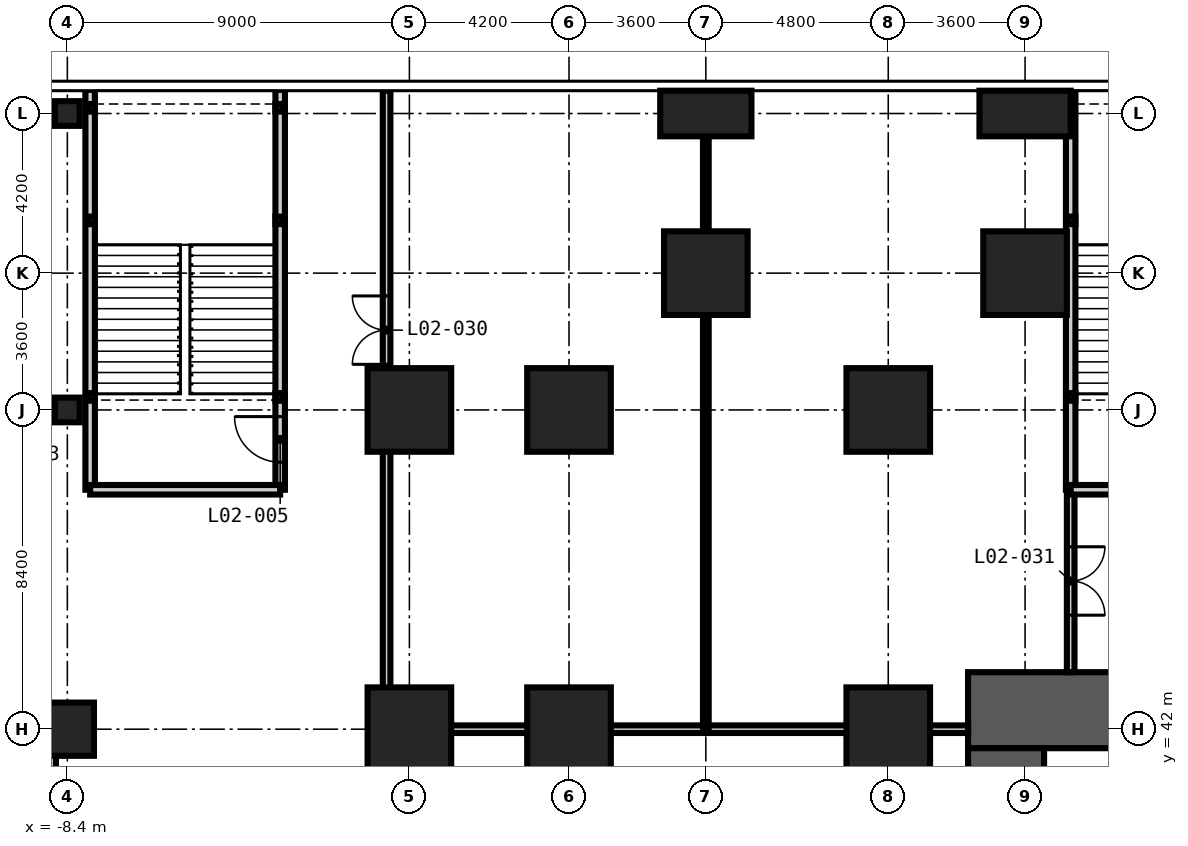
"""IFC4 building model, lengths in metres.
Left out: names, types, materials, properties, quantities, classifications, styles, units other than length and angle.
Written with IfcOpenShell. Run it as: python <this file> out.ifc"""

import sys

from ifc_helpers import new_model, si_unit, direction, frame, frame_2d, origin, origin_2d, place, context, subcontext, project, spatial, rectangle, hollow_rectangle, extrude, element, fill, save


model = new_model("IFC4")
c1 = context("Model", 3, precision=1e-05, world=origin(), true_north=direction((0.0, 1.0)))
c2 = subcontext(c1, "Body", "Model", "MODEL_VIEW")
j1 = project(units=[si_unit("LENGTHUNIT", "METRE"), si_unit("PLANEANGLEUNIT", "RADIAN")], contexts=[c1])
p1 = place(None, origin())
s1 = spatial("IfcSite", under=j1, at=p1, CompositionType="ELEMENT")
p2 = place(p1, origin())
s2 = spatial("IfcBuilding", under=s1, at=p2, CompositionType="ELEMENT")
p3 = place(p2, frame((0.0, 0.0, 12.0)))
s3 = spatial("IfcBuildingStorey", under=s2, at=p3, CompositionType="ELEMENT", Elevation=12.0)
for number, where, z_axis, x_axis in (
    (1, (0.6, 42.0, -0.3), (0.0, 0.0, 1.0), (1.0, 0.0, 0.0)),
    (2, (0.6, 50.4, -0.3), (0.0, 0.0, 1.0), (1.0, 0.0, 0.0)),
    (3, (4.8, 42.0, -0.3), (0.0, 0.0, 1.0), (1.0, 0.0, 0.0)),
    (4, (4.8, 50.4, -0.3), (0.0, 0.0, 1.0), (1.0, 0.0, 0.0)),
    (5, (8.4, 54.0, -0.3), (0.0, 0.0, 1.0), (1.0, 0.0, 0.0)),
):
    element("IfcColumn", number, at=place(p3, frame(where, z_axis=z_axis, x_axis=x_axis)), inside=s3, PredefinedType="COLUMN", context=c2, shape_type="SweptSolid", body=[
        extrude(rectangle(XDim=2.2, YDim=2.2, at=origin_2d()), origin(), (0.0, 0.0, 1.0), 5.0),
    ])
p4 = place(p3, frame((8.4, 58.2, -0.3), z_axis=(0.0, 0.0, 1.0), x_axis=(1.0, 0.0, 0.0)))
e6 = element("IfcColumn", 6, at=p4, inside=s3, PredefinedType="COLUMN", context=c2, shape_type="SweptSolid", body=[
    extrude(rectangle(XDim=2.4, YDim=1.2, at=origin_2d()), origin(), (0.0, 0.0, 1.0), 5.0),
])
for number, where, z_axis, x_axis in (
    (7, (13.2, 42.0, -0.3), (0.0, 0.0, 1.0), (1.0, 0.0, 0.0)),
    (8, (13.2, 50.4, -0.3), (0.0, 0.0, 1.0), (1.0, 0.0, 0.0)),
    (9, (16.8, 54.0, -0.3), (0.0, 0.0, 1.0), (1.0, 0.0, 0.0)),
):
    element("IfcColumn", number, at=place(p3, frame(where, z_axis=z_axis, x_axis=x_axis)), inside=s3, PredefinedType="COLUMN", context=c2, shape_type="SweptSolid", body=[
        extrude(rectangle(XDim=2.2, YDim=2.2, at=origin_2d()), origin(), (0.0, 0.0, 1.0), 5.0),
    ])
p5 = place(p3, frame((16.8, 58.2, -0.3), z_axis=(0.0, 0.0, 1.0), x_axis=(1.0, 0.0, 0.0)))
e10 = element("IfcColumn", 10, at=p5, inside=s3, PredefinedType="COLUMN", context=c2, shape_type="SweptSolid", body=[
    extrude(rectangle(XDim=2.4, YDim=1.2, at=origin_2d()), origin(), (0.0, 0.0, 1.0), 5.0),
])
p6 = place(p3, frame((-8.4, 42.0, -0.3), z_axis=(0.0, 0.0, 1.0), x_axis=(1.0, 0.0, 0.0)))
e11 = element("IfcColumn", 11, at=p6, inside=s3, PredefinedType="COLUMN", context=c2, shape_type="SweptSolid", body=[
    extrude(rectangle(XDim=1.4, YDim=1.4, at=origin_2d()), origin(), (0.0, 0.0, 1.0), 5.0),
])
for number, where, z_axis, x_axis in (
    (12, (-8.4, 50.4, -0.3), (0.0, 0.0, 1.0), (1.0, 0.0, 0.0)),
    (13, (-8.4, 58.2, -0.3), (0.0, 0.0, 1.0), (1.0, 0.0, 0.0)),
):
    element("IfcColumn", number, at=place(p3, frame(where, z_axis=z_axis, x_axis=x_axis)), inside=s3, PredefinedType="COLUMN", context=c2, shape_type="SweptSolid", body=[
        extrude(rectangle(XDim=0.65, YDim=0.65, at=origin_2d()), origin(), (0.0, 0.0, 1.0), 5.0),
    ])
p7 = place(p3, frame((43.5, 42.5, -0.3), z_axis=(0.0, 0.0, 1.0), x_axis=(-1.0, 0.0, 0.0)))
e14 = element("IfcWall", 14, at=p7, inside=s3, PredefinedType="SHEAR", context=c2, shape_type="SweptSolid", body=[
    extrude(rectangle(XDim=28.2, YDim=2.0, at=frame_2d((14.1, 0.0))), origin(), (0.0, 0.0, 1.0), 5.0),
])
p8 = place(p7, frame((21.4, 0.0, 0.3)))
e15 = element("IfcOpeningElement", 15, at=p8, cuts=e14, PredefinedType="OPENING", context=c2, shape_type="SweptSolid", body=[
    extrude(rectangle(XDim=1.0, YDim=2.1, at=frame_2d((0.5, 1.05))), frame((0.0, 1.01, 0.0), z_axis=(0.0, -1.0, 0.0), x_axis=(1.0, 0.0, 0.0)), (0.0, 0.0, 1.0), 2.02),
])
p9 = place(p7, frame((11.4, 0.0, 0.3)))
e16 = element("IfcOpeningElement", 16, at=p9, cuts=e14, PredefinedType="OPENING", context=c2, shape_type="SweptSolid", body=[
    extrude(rectangle(XDim=1.2, YDim=2.2, at=frame_2d((0.6, 1.1))), frame((0.0, 1.01, 0.0), z_axis=(0.0, -1.0, 0.0), x_axis=(1.0, 0.0, 0.0)), (0.0, 0.0, 1.0), 2.02),
])
p10 = place(p3, frame((16.3, 41.5, -0.3), z_axis=(0.0, 0.0, 1.0), x_axis=(0.0, -1.0, 0.0)))
e17 = element("IfcWall", 17, at=p10, inside=s3, PredefinedType="SHEAR", context=c2, shape_type="SweptSolid", body=[
    extrude(rectangle(XDim=24.2, YDim=2.0, at=frame_2d((12.1, 0.0))), origin(), (0.0, 0.0, 1.0), 5.0),
])
p11 = place(p10, frame((11.2, 0.0, 0.3)))
e18 = element("IfcOpeningElement", 18, at=p11, cuts=e17, PredefinedType="OPENING", context=c2, shape_type="SweptSolid", body=[
    extrude(rectangle(XDim=1.8, YDim=2.2, at=frame_2d((0.9, 1.1))), frame((0.0, 1.01, 0.0), z_axis=(0.0, -1.0, 0.0), x_axis=(1.0, 0.0, 0.0)), (0.0, 0.0, 1.0), 2.02),
])
p12 = place(p10, frame((20.0, 0.0, 0.3)))
e19 = element("IfcOpeningElement", 19, at=p12, cuts=e17, PredefinedType="OPENING", context=c2, shape_type="SweptSolid", body=[
    extrude(rectangle(XDim=1.0, YDim=2.1, at=frame_2d((0.5, 1.05))), frame((0.0, 1.01, 0.0), z_axis=(0.0, -1.0, 0.0), x_axis=(1.0, 0.0, 0.0)), (0.0, 0.0, 1.0), 2.02),
])
p13 = place(p10, frame((5.3, 0.0, 0.3)))
e20 = element("IfcOpeningElement", 20, at=p13, cuts=e17, PredefinedType="OPENING", context=c2, shape_type="SweptSolid", body=[
    extrude(rectangle(XDim=1.0, YDim=2.1, at=frame_2d((0.5, 1.05))), frame((0.0, 1.01, 0.0), z_axis=(0.0, -1.0, 0.0), x_axis=(1.0, 0.0, 0.0)), (0.0, 0.0, 1.0), 2.02),
])
p14 = place(p3, frame((-8.85, 42.0, 0.0), z_axis=(0.0, 0.0, 1.0), x_axis=(0.0, -1.0, 0.0)))
e21 = element("IfcWall", 21, at=p14, inside=s3, PredefinedType="PARTITIONING", context=c2, shape_type="SweptSolid", body=[
    extrude(rectangle(XDim=33.6, YDim=0.3, at=frame_2d((16.8, 0.0))), origin(), (0.0, 0.0, 1.0), 4.7),
])
p15 = place(p3, frame((0.0, 42.0, 0.0), z_axis=(0.0, 0.0, 1.0), x_axis=(0.0, 1.0, 0.0)))
e22 = element("IfcWall", 22, at=p15, inside=s3, PredefinedType="PARTITIONING", context=c2, shape_type="SweptSolid", body=[
    extrude(rectangle(XDim=16.8, YDim=0.2, at=frame_2d((8.4, 0.0))), origin(), (0.0, 0.0, 1.0), 4.7),
])
p16 = place(p15, frame((9.6, 0.0, 0.0)))
e23 = element("IfcOpeningElement", 23, at=p16, cuts=e22, PredefinedType="OPENING", context=c2, shape_type="SweptSolid", body=[
    extrude(rectangle(XDim=1.8, YDim=2.4, at=frame_2d((0.9, 1.2))), frame((0.0, 0.11, 0.0), z_axis=(0.0, -1.0, 0.0), x_axis=(1.0, 0.0, 0.0)), (0.0, 0.0, 1.0), 0.22),
])
p17 = place(p3, frame((18.0, 48.3, 0.0), z_axis=(0.0, 0.0, 1.0), x_axis=(0.0, -1.0, 0.0)))
e24 = element("IfcWall", 24, at=p17, inside=s3, PredefinedType="PARTITIONING", context=c2, shape_type="SweptSolid", body=[
    extrude(rectangle(XDim=4.8, YDim=0.2, at=frame_2d((2.4, 0.0))), origin(), (0.0, 0.0, 1.0), 4.7),
])
p18 = place(p17, frame((1.5, 0.0, 0.0)))
e25 = element("IfcOpeningElement", 25, at=p18, cuts=e24, PredefinedType="OPENING", context=c2, shape_type="SweptSolid", body=[
    extrude(rectangle(XDim=1.8, YDim=2.4, at=frame_2d((0.9, 1.2))), frame((0.0, 0.11, 0.0), z_axis=(0.0, -1.0, 0.0), x_axis=(1.0, 0.0, 0.0)), (0.0, 0.0, 1.0), 0.22),
])
p19 = place(p3, frame((15.3, 42.0, 0.0), z_axis=(0.0, 0.0, 1.0), x_axis=(-1.0, 0.0, 0.0)))
e26 = element("IfcWall", 26, at=p19, inside=s3, PredefinedType="PARTITIONING", context=c2, shape_type="SweptSolid", body=[
    extrude(rectangle(XDim=15.3, YDim=0.2, at=frame_2d((7.65, 0.0))), origin(), (0.0, 0.0, 1.0), 4.7),
])
p20 = place(p3, frame((8.4, 42.0, 0.0), z_axis=(0.0, 0.0, 1.0), x_axis=(0.0, 1.0, 0.0)))
e27 = element("IfcWall", 27, at=p20, inside=s3, PredefinedType="PARTITIONING", context=c2, shape_type="SweptSolid", body=[
    extrude(rectangle(XDim=16.8, YDim=0.15, at=frame_2d((8.4, 0.0))), origin(), (0.0, 0.0, 1.0), 4.7),
])
p21 = place(p3, frame((-7.8, 48.3, 0.0), z_axis=(0.0, 0.0, 1.0), x_axis=(0.0, 1.0, 0.0)))
e28 = element("IfcWall", 28, at=p21, inside=s3, PredefinedType="PARTITIONING", context=c2, shape_type="SweptSolid", body=[
    extrude(rectangle(XDim=10.523, YDim=0.25, at=frame_2d((5.261, 0.0))), origin(), (0.0, 0.0, 1.0), 4.7),
])
p22 = place(p3, frame((-2.8, 48.3, 0.0), z_axis=(0.0, 0.0, 1.0), x_axis=(0.0, 1.0, 0.0)))
e29 = element("IfcWall", 29, at=p22, inside=s3, PredefinedType="PARTITIONING", context=c2, shape_type="SweptSolid", body=[
    extrude(rectangle(XDim=10.523, YDim=0.25, at=frame_2d((5.261, 0.0))), origin(), (0.0, 0.0, 1.0), 4.7),
])
p23 = place(p22, frame((0.725, 0.0, 0.0)))
e30 = element("IfcOpeningElement", 30, at=p23, cuts=e29, PredefinedType="OPENING", context=c2, shape_type="SweptSolid", body=[
    extrude(rectangle(XDim=1.2, YDim=2.2, at=frame_2d((0.6, 1.1))), frame((0.0, 0.135, 0.0), z_axis=(0.0, -1.0, 0.0), x_axis=(1.0, 0.0, 0.0)), (0.0, 0.0, 1.0), 0.27),
])
p24 = place(p3, frame((18.0, 48.3, 0.0), z_axis=(0.0, 0.0, 1.0), x_axis=(0.0, 1.0, 0.0)))
e31 = element("IfcWall", 31, at=p24, inside=s3, PredefinedType="PARTITIONING", context=c2, shape_type="SweptSolid", body=[
    extrude(rectangle(XDim=10.523, YDim=0.25, at=frame_2d((5.261, 0.0))), origin(), (0.0, 0.0, 1.0), 4.7),
])
for number, where, z_axis, x_axis in (
    (32, (-7.8, 48.3, 0.0), (0.0, 0.0, 1.0), (1.0, 0.0, 0.0)),
    (33, (18.0, 48.3, 0.0), (0.0, 0.0, 1.0), (1.0, 0.0, 0.0)),
):
    element("IfcWall", number, at=place(p3, frame(where, z_axis=z_axis, x_axis=x_axis)), inside=s3, PredefinedType="PARTITIONING", context=c2, shape_type="SweptSolid", body=[
        extrude(rectangle(XDim=5.0, YDim=0.25, at=frame_2d((2.5, 0.0))), origin(), (0.0, 0.0, 1.0), 4.7),
    ])
for number, where, z_axis, x_axis in (
    (34, (-7.775, 50.742, -0.3), (0.0, 0.0, 1.0), (1.0, 0.0, 0.0)),
    (35, (-2.825, 50.742, -0.3), (0.0, 0.0, 1.0), (1.0, 0.0, 0.0)),
    (36, (-7.775, 55.387, -0.3), (0.0, 0.0, 1.0), (1.0, 0.0, 0.0)),
    (37, (-2.825, 55.387, -0.3), (0.0, 0.0, 1.0), (1.0, 0.0, 0.0)),
    (38, (-7.775, 58.35, -0.3), (0.0, 0.0, 1.0), (1.0, 0.0, 0.0)),
    (39, (-2.825, 58.35, -0.3), (0.0, 0.0, 1.0), (1.0, 0.0, 0.0)),
    (40, (18.025, 50.742, -0.3), (0.0, 0.0, 1.0), (1.0, 0.0, 0.0)),
    (41, (18.025, 55.387, -0.3), (0.0, 0.0, 1.0), (1.0, 0.0, 0.0)),
):
    element("IfcColumn", number, at=place(p3, frame(where, z_axis=z_axis, x_axis=x_axis)), inside=s3, PredefinedType="COLUMN", context=c2, shape_type="SweptSolid", body=[
        extrude(hollow_rectangle(XDim=0.2, YDim=0.2, WallThickness=0.01, at=origin_2d()), origin(), (0.0, 0.0, 1.0), 5.0),
    ])
p25 = place(p23, origin())
e42 = element("IfcDoor", 42, at=p25, inside=s3, OperationType="SINGLE_SWING_RIGHT", PredefinedType="DOOR", context=c2, shape_type="SweptSolid", body=[
    extrude(rectangle(XDim=1.2, YDim=2.2, at=frame_2d((0.6, 1.1))), frame((0.0, 0.025, 0.0), z_axis=(0.0, -1.0, 0.0), x_axis=(1.0, 0.0, 0.0)), (0.0, 0.0, 1.0), 0.05),
])
fill(e30, e42)
p26 = place(p16, origin())
e43 = element("IfcDoor", 43, at=p26, inside=s3, OperationType="DOUBLE_DOOR_DOUBLE_SWING", PredefinedType="DOOR", context=c2, shape_type="SweptSolid", body=[
    extrude(rectangle(XDim=1.8, YDim=2.4, at=frame_2d((0.9, 1.2))), frame((0.0, 0.025, 0.0), z_axis=(0.0, -1.0, 0.0), x_axis=(1.0, 0.0, 0.0)), (0.0, 0.0, 1.0), 0.05),
])
fill(e23, e43)
p27 = place(p18, origin())
e44 = element("IfcDoor", 44, at=p27, inside=s3, OperationType="DOUBLE_DOOR_DOUBLE_SWING", PredefinedType="DOOR", context=c2, shape_type="SweptSolid", body=[
    extrude(rectangle(XDim=1.8, YDim=2.4, at=frame_2d((0.9, 1.2))), frame((0.0, 0.025, 0.0), z_axis=(0.0, -1.0, 0.0), x_axis=(1.0, 0.0, 0.0)), (0.0, 0.0, 1.0), 0.05),
])
fill(e25, e44)
save(model, sys.argv[1])
